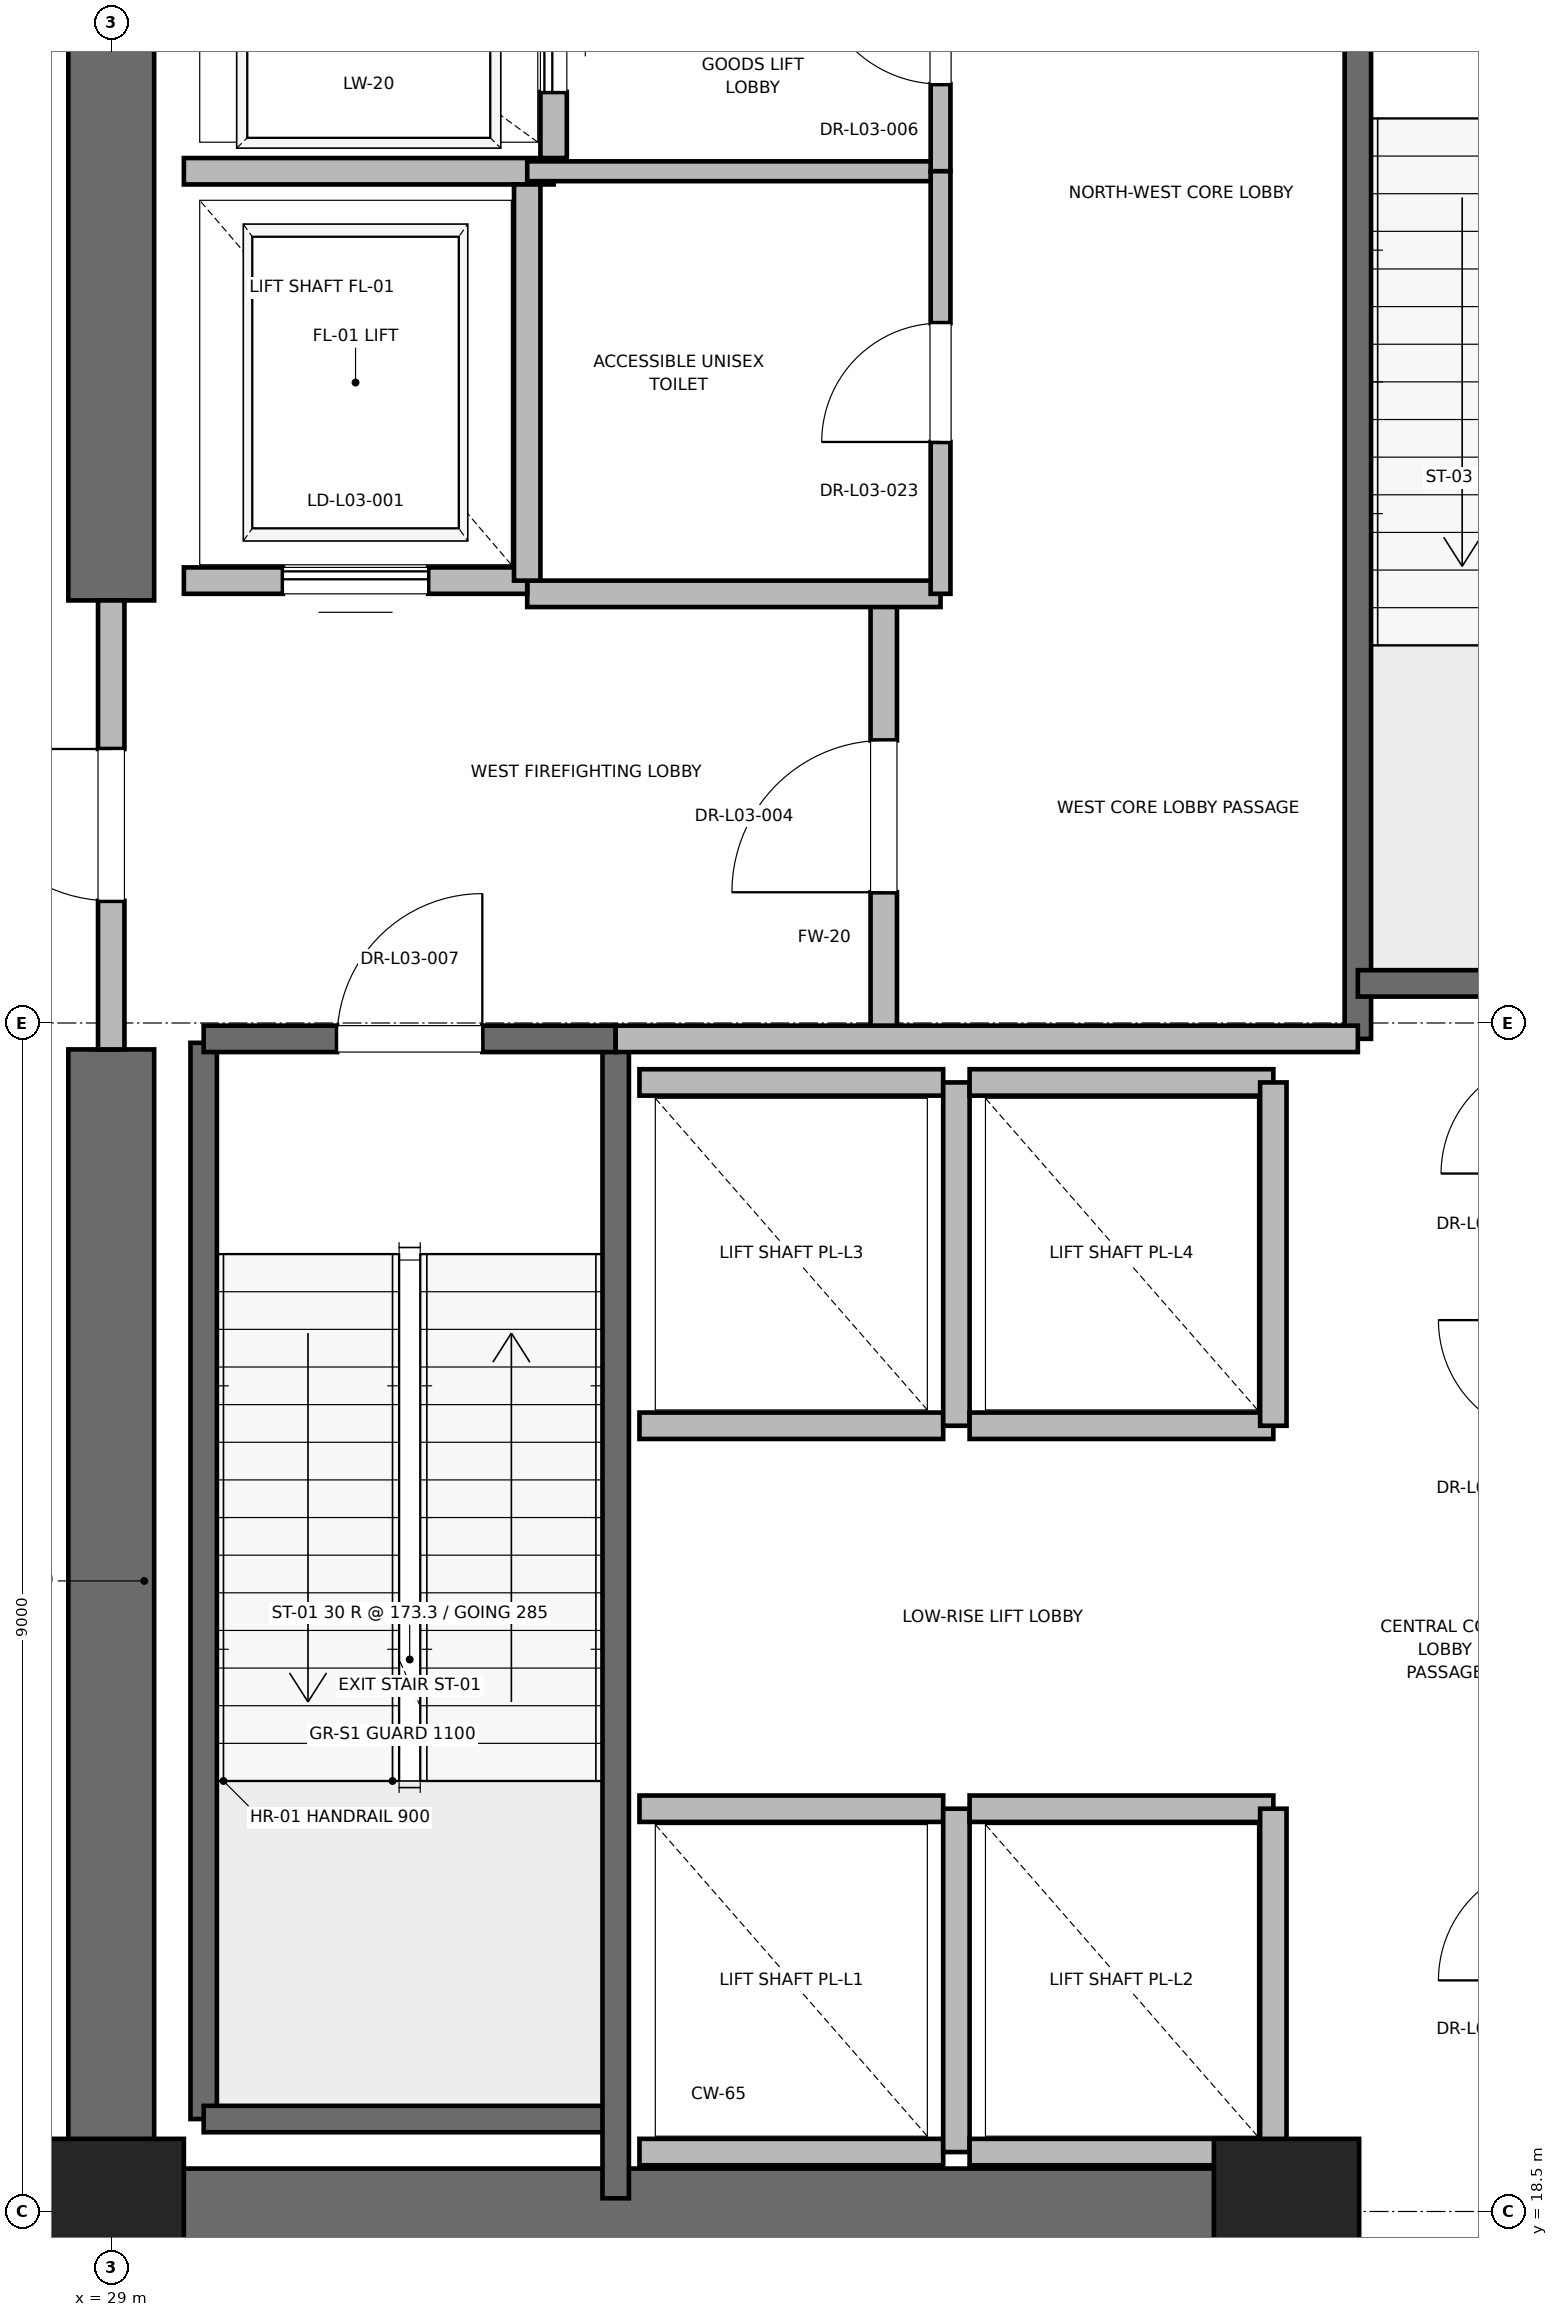
"""IFC4 building model, lengths in metres.
Left out: names, types, materials, properties, quantities, classifications, styles, units other than length and angle.
Written with IfcOpenShell. Run it as: python <this file> out.ifc"""

import sys

from ifc_helpers import new_model, si_unit, direction, frame, frame_2d, origin, origin_2d, place, context, subcontext, project, spatial, rectangle, extrude, element, fill, save


model = new_model("IFC4")
c1 = context("Model", 3, precision=1e-05, world=origin(), true_north=direction((0.0, 1.0)))
c2 = subcontext(c1, "Body", "Model", "MODEL_VIEW")
j1 = project(units=[si_unit("LENGTHUNIT", "METRE"), si_unit("PLANEANGLEUNIT", "RADIAN")], contexts=[c1])
p1 = place(None, origin())
s1 = spatial("IfcSite", under=j1, at=p1, CompositionType="ELEMENT")
p2 = place(p1, origin())
s2 = spatial("IfcBuilding", under=s1, at=p2, CompositionType="ELEMENT")
p3 = place(p2, frame((0.0, 0.0, 16.4)))
s3 = spatial("IfcBuildingStorey", under=s2, at=p3, CompositionType="ELEMENT", Elevation=16.4)
for number, where, z_axis, x_axis in (
    (1, (29.0, 18.5, 0.0), (0.0, 0.0, 1.0), (1.0, 0.0, 0.0)),
    (2, (37.9, 18.5, 0.0), (0.0, 0.0, 1.0), (1.0, 0.0, 0.0)),
):
    element("IfcColumn", number, at=place(p3, frame(where, z_axis=z_axis, x_axis=x_axis)), inside=s3, PredefinedType="PILASTER", context=c2, shape_type="SweptSolid", body=[
        extrude(rectangle(XDim=1.1, YDim=1.1, at=origin_2d()), origin(), (0.0, 0.0, 1.0), 5.2),
    ])
p4 = place(p3, frame((29.0, 18.5, 0.0), z_axis=(0.0, 0.0, 1.0), x_axis=(1.0, 0.0, 0.0)))
e3 = element("IfcWall", 3, at=p4, inside=s3, PredefinedType="SHEAR", context=c2, shape_type="SweptSolid", body=[
    extrude(rectangle(XDim=9.2, YDim=0.65, at=frame_2d((4.6, 0.0))), origin(), (0.0, 0.0, 1.0), 4.9),
])
p5 = place(p3, frame((29.0, 18.5, 0.0), z_axis=(0.0, 0.0, 1.0), x_axis=(0.0, 1.0, 0.0)))
e4 = element("IfcWall", 4, at=p5, inside=s3, PredefinedType="SHEAR", context=c2, shape_type="SweptSolid", body=[
    extrude(rectangle(XDim=8.8, YDim=0.65, at=frame_2d((4.4, 0.0))), origin(), (0.0, 0.0, 1.0), 4.9),
])
p6 = place(p3, frame((29.0, 30.7, 0.0), z_axis=(0.0, 0.0, 1.0), x_axis=(0.0, 1.0, 0.0)))
e5 = element("IfcWall", 5, at=p6, inside=s3, PredefinedType="SHEAR", context=c2, shape_type="SweptSolid", body=[
    extrude(rectangle(XDim=5.8, YDim=0.65, at=frame_2d((2.9, 0.0))), origin(), (0.0, 0.0, 1.0), 4.9),
])
p7 = place(p3, frame((29.7, 19.2, 0.0), z_axis=(0.0, 0.0, 1.0), x_axis=(0.0, 1.0, 0.0)))
e6 = element("IfcWall", 6, at=p7, inside=s3, PredefinedType="SOLIDWALL", context=c2, shape_type="SweptSolid", body=[
    extrude(rectangle(XDim=8.15, YDim=0.2, at=frame_2d((4.075, 0.0))), origin(), (0.0, 0.0, 1.0), 4.9),
])
p8 = place(p3, frame((29.7, 19.2, 0.0), z_axis=(0.0, 0.0, 1.0), x_axis=(1.0, 0.0, 0.0)))
e7 = element("IfcWall", 7, at=p8, inside=s3, PredefinedType="SOLIDWALL", context=c2, shape_type="SweptSolid", body=[
    extrude(rectangle(XDim=3.12, YDim=0.2, at=frame_2d((1.56, 0.0))), origin(), (0.0, 0.0, 1.0), 4.9),
])
p9 = place(p3, frame((32.82, 18.6, 0.0), z_axis=(0.0, 0.0, 1.0), x_axis=(0.0, 1.0, 0.0)))
e8 = element("IfcWall", 8, at=p9, inside=s3, PredefinedType="SOLIDWALL", context=c2, shape_type="SweptSolid", body=[
    extrude(rectangle(XDim=8.78, YDim=0.2, at=frame_2d((4.39, 0.0))), origin(), (0.0, 0.0, 1.0), 4.9),
])
p10 = place(p3, frame((29.7, 27.38, 0.0), z_axis=(0.0, 0.0, 1.0), x_axis=(1.0, 0.0, 0.0)))
e9 = element("IfcWall", 9, at=p10, inside=s3, PredefinedType="SOLIDWALL", context=c2, shape_type="SweptSolid", body=[
    extrude(rectangle(XDim=3.12, YDim=0.2, at=frame_2d((1.56, 0.0))), origin(), (0.0, 0.0, 1.0), 4.9),
])
p11 = place(p10, frame((1.01, 0.0, 0.0)))
e10 = element("IfcOpeningElement", 10, at=p11, cuts=e9, PredefinedType="OPENING", context=c2, shape_type="SweptSolid", body=[
    extrude(rectangle(XDim=1.1, YDim=2.15, at=frame_2d((0.55, 1.075))), frame((0.0, 0.1, 0.0), z_axis=(0.0, -1.0, 0.0), x_axis=(1.0, 0.0, 0.0)), (0.0, 0.0, 1.0), 0.2),
])
p12 = place(p3, frame((38.44, 27.38, 0.0), z_axis=(0.0, 0.0, 1.0), x_axis=(0.0, 1.0, 0.0)))
e11 = element("IfcWall", 11, at=p12, inside=s3, PredefinedType="SOLIDWALL", context=c2, shape_type="SweptSolid", body=[
    extrude(rectangle(XDim=8.87, YDim=0.2, at=frame_2d((4.435, 0.0))), origin(), (0.0, 0.0, 1.0), 4.9),
])
p13 = place(p3, frame((38.44, 27.8, 0.0), z_axis=(0.0, 0.0, 1.0), x_axis=(1.0, 0.0, 0.0)))
e12 = element("IfcWall", 12, at=p13, inside=s3, PredefinedType="SOLIDWALL", context=c2, shape_type="SweptSolid", body=[
    extrude(rectangle(XDim=3.32, YDim=0.2, at=frame_2d((1.66, 0.0))), origin(), (0.0, 0.0, 1.0), 4.9),
])
p14 = place(p3, frame((34.85, 27.38, 0.0), z_axis=(0.0, 0.0, 1.0), x_axis=(0.0, 1.0, 0.0)))
e13 = element("IfcWall", 13, at=p14, inside=s3, PredefinedType="PARTITIONING", context=c2, shape_type="SweptSolid", body=[
    extrude(rectangle(XDim=3.37, YDim=0.2, at=frame_2d((1.685, 0.0))), origin(), (0.0, 0.0, 1.0), 4.9),
])
p15 = place(p14, frame((1.11, 0.0, 0.0)))
e14 = element("IfcOpeningElement", 14, at=p15, cuts=e13, PredefinedType="OPENING", context=c2, shape_type="SweptSolid", body=[
    extrude(rectangle(XDim=1.15, YDim=2.2, at=frame_2d((0.575, 1.1))), frame((0.0, 0.1, 0.0), z_axis=(0.0, -1.0, 0.0), x_axis=(1.0, 0.0, 0.0)), (0.0, 0.0, 1.0), 0.2),
])
p16 = place(p3, frame((29.0, 27.3, 0.0), z_axis=(0.0, 0.0, 1.0), x_axis=(0.0, 1.0, 0.0)))
e15 = element("IfcWall", 15, at=p16, inside=s3, PredefinedType="PARTITIONING", context=c2, shape_type="SweptSolid", body=[
    extrude(rectangle(XDim=3.4, YDim=0.2, at=frame_2d((1.7, 0.0))), origin(), (0.0, 0.0, 1.0), 3.68),
])
p17 = place(p16, frame((1.125, 0.0, 0.0)))
e16 = element("IfcOpeningElement", 16, at=p17, cuts=e15, PredefinedType="OPENING", context=c2, shape_type="SweptSolid", body=[
    extrude(rectangle(XDim=1.15, YDim=2.2, at=frame_2d((0.575, 1.1))), frame((0.0, 0.1, 0.0), z_axis=(0.0, -1.0, 0.0), x_axis=(1.0, 0.0, 0.0)), (0.0, 0.0, 1.0), 0.2),
])
p18 = place(p3, frame((32.82, 27.38, 0.0), z_axis=(0.0, 0.0, 1.0), x_axis=(1.0, 0.0, 0.0)))
e17 = element("IfcWall", 17, at=p18, inside=s3, PredefinedType="PARTITIONING", context=c2, shape_type="SweptSolid", body=[
    extrude(rectangle(XDim=5.62, YDim=0.2, at=frame_2d((2.81, 0.0))), origin(), (0.0, 0.0, 1.0), 4.9),
])
p19 = place(p3, frame((32.15, 30.75, 0.0), z_axis=(0.0, 0.0, 1.0), x_axis=(1.0, 0.0, 0.0)))
e18 = element("IfcWall", 18, at=p19, inside=s3, PredefinedType="PARTITIONING", context=c2, shape_type="SweptSolid", body=[
    extrude(rectangle(XDim=3.13, YDim=0.2, at=frame_2d((1.565, 0.0))), origin(), (0.0, 0.0, 1.0), 4.9),
])
p20 = place(p3, frame((29.55, 30.85, 0.0), z_axis=(0.0, 0.0, 1.0), x_axis=(1.0, 0.0, 0.0)))
e19 = element("IfcWall", 19, at=p20, inside=s3, PredefinedType="SOLIDWALL", context=c2, shape_type="SweptSolid", body=[
    extrude(rectangle(XDim=2.6, YDim=0.2, at=frame_2d((1.3, 0.0))), origin(), (0.0, 0.0, 1.0), 3.68),
])
p21 = place(p20, frame((0.75, 0.0, 0.0)))
e20 = element("IfcOpeningElement", 20, at=p21, cuts=e19, PredefinedType="OPENING", context=c2, shape_type="SweptSolid", body=[
    extrude(rectangle(XDim=1.1, YDim=2.2, at=frame_2d((0.55, 1.1))), frame((0.0, 0.1, 0.0), z_axis=(0.0, -1.0, 0.0), x_axis=(1.0, 0.0, 0.0)), (0.0, 0.0, 1.0), 0.2),
])
p22 = place(p3, frame((29.55, 33.95, 0.0), z_axis=(0.0, 0.0, 1.0), x_axis=(1.0, 0.0, 0.0)))
e21 = element("IfcWall", 21, at=p22, inside=s3, PredefinedType="SOLIDWALL", context=c2, shape_type="SweptSolid", body=[
    extrude(rectangle(XDim=2.8, YDim=0.2, at=frame_2d((1.4, 0.0))), origin(), (0.0, 0.0, 1.0), 4.9),
])
p23 = place(p3, frame((32.15, 30.85, 0.0), z_axis=(0.0, 0.0, 1.0), x_axis=(0.0, 1.0, 0.0)))
e22 = element("IfcWall", 22, at=p23, inside=s3, PredefinedType="SOLIDWALL", context=c2, shape_type="SweptSolid", body=[
    extrude(rectangle(XDim=3.0, YDim=0.2, at=frame_2d((1.5, 0.0))), origin(), (0.0, 0.0, 1.0), 4.9),
])
p24 = place(p3, frame((32.35, 34.05, 0.0), z_axis=(0.0, 0.0, 1.0), x_axis=(0.0, 1.0, 0.0)))
e23 = element("IfcWall", 23, at=p24, inside=s3, PredefinedType="SOLIDWALL", context=c2, shape_type="SweptSolid", body=[
    extrude(rectangle(XDim=2.1, YDim=0.2, at=frame_2d((1.05, 0.0))), origin(), (0.0, 0.0, 1.0), 4.9),
])
p25 = place(p24, frame((0.5, 0.0, 0.0)))
e24 = element("IfcOpeningElement", 24, at=p25, cuts=e23, PredefinedType="OPENING", context=c2, shape_type="SweptSolid", body=[
    extrude(rectangle(XDim=1.1, YDim=2.2, at=frame_2d((0.55, 1.1))), frame((0.0, 0.1, 0.0), z_axis=(0.0, -1.0, 0.0), x_axis=(1.0, 0.0, 0.0)), (0.0, 0.0, 1.0), 0.2),
])
for number, where, z_axis, x_axis in (
    (25, (33.0, 18.95, 0.0), (0.0, 0.0, 1.0), (1.0, 0.0, 0.0)),
    (26, (35.3, 21.55, 0.0), (0.0, 0.0, 1.0), (-1.0, 0.0, 0.0)),
):
    element("IfcWall", number, at=place(p3, frame(where, z_axis=z_axis, x_axis=x_axis)), inside=s3, PredefinedType="SOLIDWALL", context=c2, shape_type="SweptSolid", body=[
        extrude(rectangle(XDim=2.3, YDim=0.2, at=frame_2d((1.15, 0.0))), origin(), (0.0, 0.0, 1.0), 4.9),
    ])
p26 = place(p3, frame((35.4, 18.95, 0.0), z_axis=(0.0, 0.0, 1.0), x_axis=(0.0, 1.0, 0.0)))
e27 = element("IfcWall", 27, at=p26, inside=s3, PredefinedType="SOLIDWALL", context=c2, shape_type="SweptSolid", body=[
    extrude(rectangle(XDim=2.6, YDim=0.2, at=frame_2d((1.3, 0.0))), origin(), (0.0, 0.0, 1.0), 4.9),
])
p27 = place(p3, frame((35.5, 18.95, 0.0), z_axis=(0.0, 0.0, 1.0), x_axis=(1.0, 0.0, 0.0)))
e28 = element("IfcWall", 28, at=p27, inside=s3, PredefinedType="SOLIDWALL", context=c2, shape_type="SweptSolid", body=[
    extrude(rectangle(XDim=2.3, YDim=0.2, at=frame_2d((1.15, 0.0))), origin(), (0.0, 0.0, 1.0), 3.68),
])
p28 = place(p3, frame((37.8, 21.55, 0.0), z_axis=(0.0, 0.0, 1.0), x_axis=(-1.0, 0.0, 0.0)))
e29 = element("IfcWall", 29, at=p28, inside=s3, PredefinedType="SOLIDWALL", context=c2, shape_type="SweptSolid", body=[
    extrude(rectangle(XDim=2.3, YDim=0.2, at=frame_2d((1.15, 0.0))), origin(), (0.0, 0.0, 1.0), 4.9),
])
p29 = place(p3, frame((37.8, 18.95, 0.0), z_axis=(0.0, 0.0, 1.0), x_axis=(0.0, 1.0, 0.0)))
e30 = element("IfcWall", 30, at=p29, inside=s3, PredefinedType="SOLIDWALL", context=c2, shape_type="SweptSolid", body=[
    extrude(rectangle(XDim=2.6, YDim=0.2, at=frame_2d((1.3, 0.0))), origin(), (0.0, 0.0, 1.0), 3.68),
])
for number, where, z_axis, x_axis in (
    (31, (33.0, 24.45, 0.0), (0.0, 0.0, 1.0), (1.0, 0.0, 0.0)),
    (32, (35.3, 27.05, 0.0), (0.0, 0.0, 1.0), (-1.0, 0.0, 0.0)),
):
    element("IfcWall", number, at=place(p3, frame(where, z_axis=z_axis, x_axis=x_axis)), inside=s3, PredefinedType="SOLIDWALL", context=c2, shape_type="SweptSolid", body=[
        extrude(rectangle(XDim=2.3, YDim=0.2, at=frame_2d((1.15, 0.0))), origin(), (0.0, 0.0, 1.0), 4.9),
    ])
p30 = place(p3, frame((35.4, 24.45, 0.0), z_axis=(0.0, 0.0, 1.0), x_axis=(0.0, 1.0, 0.0)))
e33 = element("IfcWall", 33, at=p30, inside=s3, PredefinedType="SOLIDWALL", context=c2, shape_type="SweptSolid", body=[
    extrude(rectangle(XDim=2.6, YDim=0.2, at=frame_2d((1.3, 0.0))), origin(), (0.0, 0.0, 1.0), 4.9),
])
for number, where, z_axis, x_axis in (
    (34, (35.5, 24.45, 0.0), (0.0, 0.0, 1.0), (1.0, 0.0, 0.0)),
    (35, (37.8, 27.05, 0.0), (0.0, 0.0, 1.0), (-1.0, 0.0, 0.0)),
):
    element("IfcWall", number, at=place(p3, frame(where, z_axis=z_axis, x_axis=x_axis)), inside=s3, PredefinedType="SOLIDWALL", context=c2, shape_type="SweptSolid", body=[
        extrude(rectangle(XDim=2.3, YDim=0.2, at=frame_2d((1.15, 0.0))), origin(), (0.0, 0.0, 1.0), 4.9),
    ])
p31 = place(p3, frame((37.8, 24.45, 0.0), z_axis=(0.0, 0.0, 1.0), x_axis=(0.0, 1.0, 0.0)))
e36 = element("IfcWall", 36, at=p31, inside=s3, PredefinedType="SOLIDWALL", context=c2, shape_type="SweptSolid", body=[
    extrude(rectangle(XDim=2.6, YDim=0.2, at=frame_2d((1.3, 0.0))), origin(), (0.0, 0.0, 1.0), 4.9),
])
p32 = place(p3, frame((32.15, 33.95, 0.0), z_axis=(0.0, 0.0, 1.0), x_axis=(1.0, 0.0, 0.0)))
e37 = element("IfcWall", 37, at=p32, inside=s3, PredefinedType="PARTITIONING", context=c2, shape_type="SweptSolid", body=[
    extrude(rectangle(XDim=3.13, YDim=0.15, at=frame_2d((1.565, 0.0))), origin(), (0.0, 0.0, 1.0), 2.85),
])
p33 = place(p3, frame((35.28, 33.95, 0.0), z_axis=(0.0, 0.0, 1.0), x_axis=(0.0, 1.0, 0.0)))
e38 = element("IfcWall", 38, at=p33, inside=s3, PredefinedType="PARTITIONING", context=c2, shape_type="SweptSolid", body=[
    extrude(rectangle(XDim=2.27, YDim=0.15, at=frame_2d((1.135, 0.0))), origin(), (0.0, 0.0, 1.0), 2.85),
])
p34 = place(p33, frame((0.66, 0.0, 0.0)))
e39 = element("IfcOpeningElement", 39, at=p34, cuts=e38, PredefinedType="OPENING", context=c2, shape_type="SweptSolid", body=[
    extrude(rectangle(XDim=0.95, YDim=2.15, at=frame_2d((0.475, 1.075))), frame((0.0, 0.075, 0.0), z_axis=(0.0, -1.0, 0.0), x_axis=(1.0, 0.0, 0.0)), (0.0, 0.0, 1.0), 0.15),
])
p35 = place(p3, frame((35.28, 30.75, 0.0), z_axis=(0.0, 0.0, 1.0), x_axis=(0.0, 1.0, 0.0)))
e40 = element("IfcWall", 40, at=p35, inside=s3, PredefinedType="PARTITIONING", context=c2, shape_type="SweptSolid", body=[
    extrude(rectangle(XDim=3.2, YDim=0.15, at=frame_2d((1.6, 0.0))), origin(), (0.0, 0.0, 1.0), 2.85),
])
p36 = place(p35, frame((1.15, 0.0, 0.0)))
e41 = element("IfcOpeningElement", 41, at=p36, cuts=e40, PredefinedType="OPENING", context=c2, shape_type="SweptSolid", body=[
    extrude(rectangle(XDim=0.9, YDim=2.1, at=frame_2d((0.45, 1.05))), frame((0.0, 0.075, 0.0), z_axis=(0.0, -1.0, 0.0), x_axis=(1.0, 0.0, 0.0)), (0.0, 0.0, 1.0), 0.15),
])
p37 = place(p11, origin())
e42 = element("IfcDoor", 42, at=p37, inside=s3, OperationType="SINGLE_SWING_RIGHT", PredefinedType="DOOR", context=c2, shape_type="SweptSolid", body=[
    extrude(rectangle(XDim=1.1, YDim=2.15, at=frame_2d((0.55, 1.075))), frame((0.0, 0.025, 0.0), z_axis=(0.0, -1.0, 0.0), x_axis=(1.0, 0.0, 0.0)), (0.0, 0.0, 1.0), 0.05),
])
fill(e10, e42)
p38 = place(p15, origin())
e43 = element("IfcDoor", 43, at=p38, inside=s3, OperationType="SINGLE_SWING_LEFT", PredefinedType="DOOR", context=c2, shape_type="SweptSolid", body=[
    extrude(rectangle(XDim=1.15, YDim=2.2, at=frame_2d((0.575, 1.1))), frame((0.0, 0.025, 0.0), z_axis=(0.0, -1.0, 0.0), x_axis=(1.0, 0.0, 0.0)), (0.0, 0.0, 1.0), 0.05),
])
fill(e14, e43)
p39 = place(p17, origin())
e44 = element("IfcDoor", 44, at=p39, inside=s3, OperationType="SINGLE_SWING_RIGHT", PredefinedType="DOOR", context=c2, shape_type="SweptSolid", body=[
    extrude(rectangle(XDim=1.15, YDim=2.2, at=frame_2d((0.575, 1.1))), frame((0.0, 0.025, 0.0), z_axis=(0.0, -1.0, 0.0), x_axis=(1.0, 0.0, 0.0)), (0.0, 0.0, 1.0), 0.05),
])
fill(e16, e44)
p40 = place(p21, origin())
e45 = element("IfcDoor", 45, at=p40, inside=s3, OperationType="SLIDING_TO_RIGHT", PredefinedType="DOOR", context=c2, shape_type="SweptSolid", body=[
    extrude(rectangle(XDim=1.1, YDim=2.2, at=frame_2d((0.55, 1.1))), frame((0.0, 0.025, 0.0), z_axis=(0.0, -1.0, 0.0), x_axis=(1.0, 0.0, 0.0)), (0.0, 0.0, 1.0), 0.05),
])
fill(e20, e45)
p41 = place(p25, origin())
e46 = element("IfcDoor", 46, at=p41, inside=s3, OperationType="SLIDING_TO_RIGHT", PredefinedType="DOOR", context=c2, shape_type="SweptSolid", body=[
    extrude(rectangle(XDim=1.1, YDim=2.2, at=frame_2d((0.55, 1.1))), frame((0.0, 0.025, 0.0), z_axis=(0.0, -1.0, 0.0), x_axis=(1.0, 0.0, 0.0)), (0.0, 0.0, 1.0), 0.05),
])
fill(e24, e46)
p42 = place(p34, origin())
e47 = element("IfcDoor", 47, at=p42, inside=s3, OperationType="SINGLE_SWING_RIGHT", PredefinedType="DOOR", context=c2, shape_type="SweptSolid", body=[
    extrude(rectangle(XDim=0.95, YDim=2.15, at=frame_2d((0.475, 1.075))), frame((0.0, 0.025, 0.0), z_axis=(0.0, -1.0, 0.0), x_axis=(1.0, 0.0, 0.0)), (0.0, 0.0, 1.0), 0.05),
])
fill(e39, e47)
p43 = place(p36, origin())
e48 = element("IfcDoor", 48, at=p43, inside=s3, OperationType="SINGLE_SWING_LEFT", PredefinedType="DOOR", context=c2, shape_type="SweptSolid", body=[
    extrude(rectangle(XDim=0.9, YDim=2.1, at=frame_2d((0.45, 1.05))), frame((0.0, 0.025, 0.0), z_axis=(0.0, -1.0, 0.0), x_axis=(1.0, 0.0, 0.0)), (0.0, 0.0, 1.0), 0.05),
])
fill(e41, e48)
save(model, sys.argv[1])
